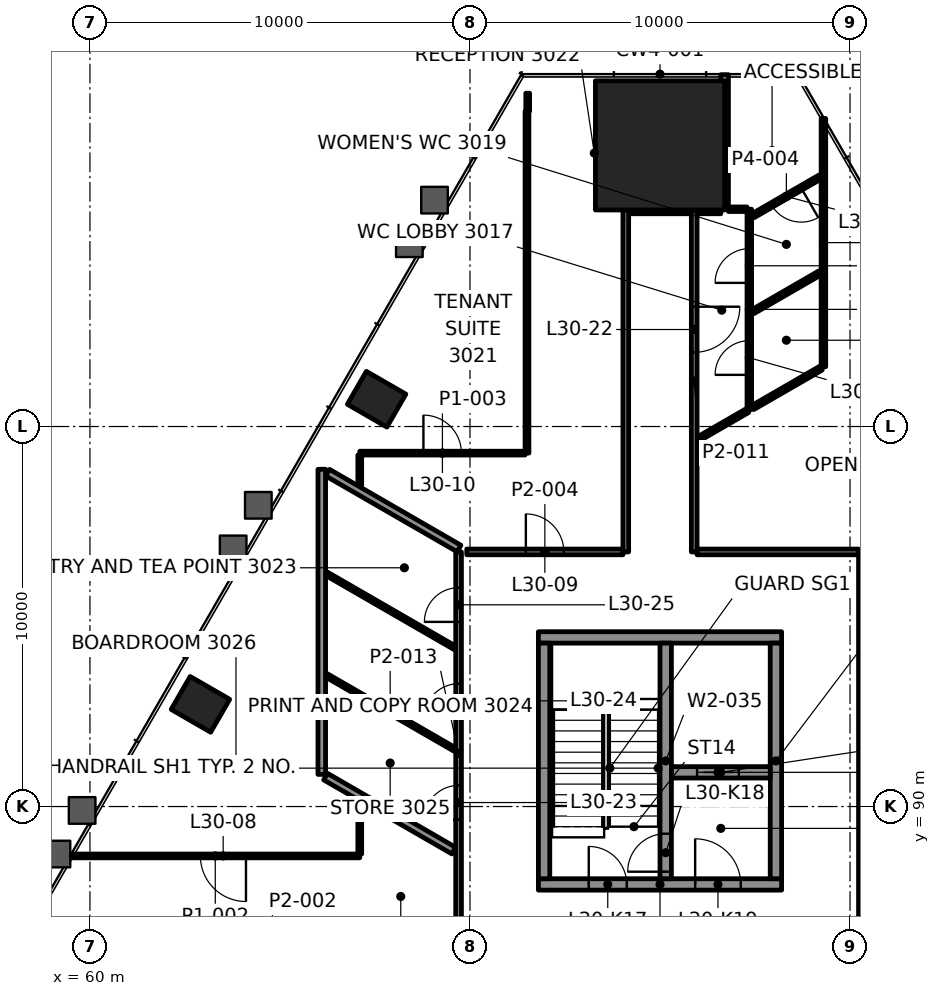
"""IFC4 building model, lengths in metres.
Left out: names, types, materials, properties, quantities, classifications, styles, units other than length and angle.
Written with IfcOpenShell. Run it as: python <this file> out.ifc"""

import sys

from ifc_helpers import new_model, si_unit, direction, frame, frame_2d, origin, origin_2d, place, context, subcontext, project, spatial, rectangle, extrude, element, fill, save


model = new_model("IFC4")
c1 = context("Model", 3, precision=1e-05, world=origin(), true_north=direction((0.0, 1.0)))
c2 = subcontext(c1, "Body", "Model", "MODEL_VIEW")
j1 = project(units=[si_unit("LENGTHUNIT", "METRE"), si_unit("PLANEANGLEUNIT", "RADIAN")], contexts=[c1])
p1 = place(None, origin())
s1 = spatial("IfcSite", under=j1, at=p1, CompositionType="ELEMENT")
p2 = place(p1, origin())
s2 = spatial("IfcBuilding", under=s1, at=p2, CompositionType="ELEMENT")
p3 = place(p2, frame((0.0, 0.0, 132.4)))
s3 = spatial("IfcBuildingStorey", under=s2, at=p3, CompositionType="ELEMENT", Elevation=132.4)
p4 = place(p3, frame((75.0, 107.399, 0.0), z_axis=(0.0, 0.0, 1.0), x_axis=(-1.0, 0.0, 0.0)))
e1 = element("IfcColumn", 1, at=p4, inside=s3, PredefinedType="COLUMN", context=c2, shape_type="SweptSolid", body=[
    extrude(rectangle(XDim=3.4, YDim=3.4, at=origin_2d()), origin(), (0.0, 0.0, 1.0), 4.2),
])
for number, where, z_axis, x_axis in (
    (2, (67.543, 100.719, -0.0), (0.0, 0.0, 1.0), (-0.5, -0.866, 0.0)),
    (3, (62.907, 92.688, -0.0), (0.0, 0.0, 1.0), (-0.5, -0.866, 0.0)),
):
    element("IfcColumn", number, at=place(p3, frame(where, z_axis=z_axis, x_axis=x_axis)), inside=s3, PredefinedType="COLUMN", context=c2, shape_type="SweptSolid", body=[
        extrude(rectangle(XDim=1.0, YDim=1.2, at=origin_2d()), origin(), (0.0, 0.0, 1.0), 4.2),
    ])
p5 = place(p3, frame((71.8, 87.95, 0.0), z_axis=(0.0, 0.0, 1.0), x_axis=(1.0, 0.0, 0.0)))
e4 = element("IfcWall", 4, at=p5, inside=s3, PredefinedType="SHEAR", context=c2, shape_type="SweptSolid", body=[
    extrude(rectangle(XDim=6.4, YDim=0.3, at=frame_2d((3.2, 0.0))), origin(), (0.0, 0.0, 1.0), 4.0),
])
p6 = place(p5, frame((1.325, 0.0, 0.0)))
e5 = element("IfcOpeningElement", 5, at=p6, cuts=e4, PredefinedType="OPENING", context=c2, shape_type="SweptSolid", body=[
    extrude(rectangle(XDim=1.0, YDim=2.1, at=frame_2d((0.5, 1.05))), frame((0.0, 0.16, 0.0), z_axis=(0.0, -1.0, 0.0), x_axis=(1.0, 0.0, 0.0)), (0.0, 0.0, 1.0), 0.32),
])
p7 = place(p5, frame((4.125, 0.0, 0.0)))
e6 = element("IfcOpeningElement", 6, at=p7, cuts=e4, PredefinedType="OPENING", context=c2, shape_type="SweptSolid", body=[
    extrude(rectangle(XDim=1.2, YDim=2.1, at=frame_2d((0.6, 1.05))), frame((0.0, 0.16, 0.0), z_axis=(0.0, -1.0, 0.0), x_axis=(1.0, 0.0, 0.0)), (0.0, 0.0, 1.0), 0.32),
])
p8 = place(p3, frame((71.8, 94.45, 0.0), z_axis=(0.0, 0.0, 1.0), x_axis=(1.0, 0.0, 0.0)))
e7 = element("IfcWall", 7, at=p8, inside=s3, PredefinedType="SHEAR", context=c2, shape_type="SweptSolid", body=[
    extrude(rectangle(XDim=6.4, YDim=0.3, at=frame_2d((3.2, 0.0))), origin(), (0.0, 0.0, 1.0), 4.0),
])
for number, where, z_axis, x_axis in (
    (8, (71.95, 88.1, 0.0), (0.0, 0.0, 1.0), (0.0, 1.0, 0.0)),
    (9, (78.05, 88.1, 0.0), (0.0, 0.0, 1.0), (0.0, 1.0, 0.0)),
):
    element("IfcWall", number, at=place(p3, frame(where, z_axis=z_axis, x_axis=x_axis)), inside=s3, PredefinedType="SHEAR", context=c2, shape_type="SweptSolid", body=[
        extrude(rectangle(XDim=6.2, YDim=0.3, at=frame_2d((3.1, 0.0))), origin(), (0.0, 0.0, 1.0), 4.0),
    ])
p9 = place(p3, frame((75.3, 90.9, 0.0), z_axis=(0.0, 0.0, 1.0), x_axis=(1.0, 0.0, 0.0)))
e10 = element("IfcWall", 10, at=p9, inside=s3, PredefinedType="SHEAR", context=c2, shape_type="SweptSolid", body=[
    extrude(rectangle(XDim=2.6, YDim=0.3, at=frame_2d((1.3, 0.0))), origin(), (0.0, 0.0, 1.0), 4.0),
])
p10 = place(p9, frame((0.675, 0.0, 0.0)))
e11 = element("IfcOpeningElement", 11, at=p10, cuts=e10, PredefinedType="OPENING", context=c2, shape_type="SweptSolid", body=[
    extrude(rectangle(XDim=1.1, YDim=2.1, at=frame_2d((0.55, 1.05))), frame((0.0, 0.16, 0.0), z_axis=(0.0, -1.0, 0.0), x_axis=(1.0, 0.0, 0.0)), (0.0, 0.0, 1.0), 0.32),
])
p11 = place(p3, frame((75.15, 88.1, 0.0), z_axis=(0.0, 0.0, 1.0), x_axis=(0.0, 1.0, 0.0)))
e12 = element("IfcWall", 12, at=p11, inside=s3, PredefinedType="SHEAR", context=c2, shape_type="SweptSolid", body=[
    extrude(rectangle(XDim=6.2, YDim=0.3, at=frame_2d((3.1, 0.0))), origin(), (0.0, 0.0, 1.0), 4.0),
])
p12 = place(p11, frame((0.185, 0.0, 0.0)))
e13 = element("IfcOpeningElement", 13, at=p12, cuts=e12, PredefinedType="OPENING", context=c2, shape_type="SweptSolid", body=[
    extrude(rectangle(XDim=1.0, YDim=2.1, at=frame_2d((0.5, 1.05))), frame((0.0, 0.16, 0.0), z_axis=(0.0, -1.0, 0.0), x_axis=(1.0, 0.0, 0.0)), (0.0, 0.0, 1.0), 0.32),
])
p13 = place(p3, frame((67.1, 88.7, 0.0), z_axis=(0.0, 0.0, 1.0), x_axis=(-1.0, 0.0, 0.0)))
e14 = element("IfcWall", 14, at=p13, inside=s3, PredefinedType="PARTITIONING", context=c2, shape_type="SweptSolid", body=[
    extrude(rectangle(XDim=7.604, YDim=0.1, at=frame_2d((3.802, 0.0))), origin(), (0.0, 0.0, 1.0), 3.165),
])
p14 = place(p13, frame((2.994, 0.0, 0.0)))
e15 = element("IfcOpeningElement", 15, at=p14, cuts=e14, PredefinedType="OPENING", context=c2, shape_type="SweptSolid", body=[
    extrude(rectangle(XDim=1.2, YDim=2.1, at=frame_2d((0.6, 1.05))), frame((0.0, 0.06, 0.0), z_axis=(0.0, -1.0, 0.0), x_axis=(1.0, 0.0, 0.0)), (0.0, 0.0, 1.0), 0.12),
])
p15 = place(p3, frame((69.915, 96.7, 0.0), z_axis=(0.0, 0.0, 1.0), x_axis=(1.0, 0.0, 0.0)))
e16 = element("IfcWall", 16, at=p15, inside=s3, PredefinedType="PARTITIONING", context=c2, shape_type="SweptSolid", body=[
    extrude(rectangle(XDim=4.11, YDim=0.15, at=frame_2d((2.055, 0.0))), origin(), (0.0, 0.0, 1.0), 3.4),
])
p16 = place(p15, frame((1.555, 0.0, 0.0)))
e17 = element("IfcOpeningElement", 17, at=p16, cuts=e16, PredefinedType="OPENING", context=c2, shape_type="SweptSolid", body=[
    extrude(rectangle(XDim=1.0, YDim=2.1, at=frame_2d((0.5, 1.05))), frame((0.0, 0.085, 0.0), z_axis=(0.0, -1.0, 0.0), x_axis=(1.0, 0.0, 0.0)), (0.0, 0.0, 1.0), 0.17),
])
p17 = place(p3, frame((75.975, 96.7, 0.0), z_axis=(0.0, 0.0, 1.0), x_axis=(1.0, 0.0, 0.0)))
e18 = element("IfcWall", 18, at=p17, inside=s3, PredefinedType="PARTITIONING", context=c2, shape_type="SweptSolid", body=[
    extrude(rectangle(XDim=4.249, YDim=0.15, at=frame_2d((2.125, 0.0))), origin(), (0.0, 0.0, 1.0), 3.4),
])
p18 = place(p3, frame((67.1, 99.3, 0.0), z_axis=(0.0, 0.0, 1.0), x_axis=(1.0, 0.0, 0.0)))
e19 = element("IfcWall", 19, at=p18, inside=s3, PredefinedType="PARTITIONING", context=c2, shape_type="SweptSolid", body=[
    extrude(rectangle(XDim=4.349, YDim=0.1, at=frame_2d((2.175, 0.0))), origin(), (0.0, 0.0, 1.0), 3.4),
])
p19 = place(p18, frame((1.675, 0.0, 0.0)))
e20 = element("IfcOpeningElement", 20, at=p19, cuts=e19, PredefinedType="OPENING", context=c2, shape_type="SweptSolid", body=[
    extrude(rectangle(XDim=1.0, YDim=2.1, at=frame_2d((0.5, 1.05))), frame((0.0, 0.06, 0.0), z_axis=(0.0, -1.0, 0.0), x_axis=(1.0, 0.0, 0.0)), (0.0, 0.0, 1.0), 0.12),
])
p20 = place(p3, frame((74.176, 105.699, 0.0), z_axis=(0.0, 0.0, 1.0), x_axis=(1.0, 0.0, 0.0)))
e21 = element("IfcWall", 21, at=p20, inside=s3, PredefinedType="PARTITIONING", context=c2, shape_type="SweptSolid", body=[
    extrude(rectangle(XDim=1.649, YDim=0.2, at=frame_2d((0.825, 0.0))), origin(), (0.0, 0.0, 1.0), 3.397),
])
p21 = place(p3, frame((76.8, 105.718, 0.0), z_axis=(0.0, 0.0, 1.0), x_axis=(1.0, 0.0, 0.0)))
e22 = element("IfcWall", 22, at=p21, inside=s3, PredefinedType="PARTITIONING", context=c2, shape_type="SweptSolid", body=[
    extrude(rectangle(XDim=0.49, YDim=0.12, at=frame_2d((0.245, 0.0))), origin(), (0.0, 0.0, 1.0), 3.4),
])
p22 = place(p3, frame((76.01, 99.673, 0.0), z_axis=(0.0, 0.0, 1.0), x_axis=(0.865943626461, 0.500141615736, 0.0)))
e23 = element("IfcWall", 23, at=p22, inside=s3, PredefinedType="PARTITIONING", context=c2, shape_type="SweptSolid", body=[
    extrude(rectangle(XDim=1.496, YDim=0.12, at=frame_2d((0.748, 0.0))), origin(), (0.0, 0.0, 1.0), 3.4),
])
p23 = place(p3, frame((77.445, 103.024, 0.0), z_axis=(0.0, 0.0, 1.0), x_axis=(0.866039589866, 0.499975428181, 0.0)))
e24 = element("IfcWall", 24, at=p23, inside=s3, PredefinedType="PARTITIONING", context=c2, shape_type="SweptSolid", body=[
    extrude(rectangle(XDim=2.033, YDim=0.12, at=frame_2d((1.016, 0.0))), origin(), (0.0, 0.0, 1.0), 3.4),
])
p24 = place(p3, frame((79.205, 106.562, 0.0), z_axis=(0.0, 0.0, 1.0), x_axis=(-0.866017611601, -0.500013496215, 0.0)))
e25 = element("IfcWall", 25, at=p24, inside=s3, PredefinedType="PARTITIONING", context=c2, shape_type="SweptSolid", body=[
    extrude(rectangle(XDim=2.033, YDim=0.12, at=frame_2d((1.017, 0.0))), origin(), (0.0, 0.0, 1.0), 3.4),
])
p25 = place(p24, frame((0.567, 0.0, 0.0)))
e26 = element("IfcOpeningElement", 26, at=p25, cuts=e25, PredefinedType="OPENING", context=c2, shape_type="SweptSolid", body=[
    extrude(rectangle(XDim=0.9, YDim=2.1, at=frame_2d((0.45, 1.05))), frame((0.0, 0.07, 0.0), z_axis=(0.0, -1.0, 0.0), x_axis=(1.0, 0.0, 0.0)), (0.0, 0.0, 1.0), 0.14),
])
p26 = place(p3, frame((80.3, 86.1, 0.0), z_axis=(0.0, 0.0, 1.0), x_axis=(0.0, 1.0, 0.0)))
e27 = element("IfcWall", 27, at=p26, inside=s3, PredefinedType="PARTITIONING", context=c2, shape_type="SweptSolid", body=[
    extrude(rectangle(XDim=10.599, YDim=0.15, at=frame_2d((5.3, 0.0))), origin(), (0.0, 0.0, 1.0), 3.322),
])
p27 = place(p3, frame((79.3, 101.573, 0.0), z_axis=(0.0, 0.0, 1.0), x_axis=(0.0, 1.0, 0.0)))
e28 = element("IfcWall", 28, at=p27, inside=s3, PredefinedType="PARTITIONING", context=c2, shape_type="SweptSolid", body=[
    extrude(rectangle(XDim=6.533, YDim=0.12, at=frame_2d((3.267, 0.0))), origin(), (0.0, 0.0, 1.0), 3.4),
])
p28 = place(p3, frame((77.35, 100.447, 0.0), z_axis=(0.0, 0.0, 1.0), x_axis=(0.0, 1.0, 0.0)))
e29 = element("IfcWall", 29, at=p28, inside=s3, PredefinedType="PARTITIONING", context=c2, shape_type="SweptSolid", body=[
    extrude(rectangle(XDim=5.271, YDim=0.12, at=frame_2d((2.635, 0.0))), origin(), (0.0, 0.0, 1.0), 3.4),
])
p29 = place(p28, frame((0.913, 0.0, 0.0)))
e30 = element("IfcOpeningElement", 30, at=p29, cuts=e29, PredefinedType="OPENING", context=c2, shape_type="SweptSolid", body=[
    extrude(rectangle(XDim=0.9, YDim=2.1, at=frame_2d((0.45, 1.05))), frame((0.0, 0.07, 0.0), z_axis=(0.0, -1.0, 0.0), x_axis=(1.0, 0.0, 0.0)), (0.0, 0.0, 1.0), 0.14),
])
p30 = place(p28, frame((3.333, 0.0, 0.0)))
e31 = element("IfcOpeningElement", 31, at=p30, cuts=e29, PredefinedType="OPENING", context=c2, shape_type="SweptSolid", body=[
    extrude(rectangle(XDim=0.9, YDim=2.1, at=frame_2d((0.45, 1.05))), frame((0.0, 0.07, 0.0), z_axis=(0.0, -1.0, 0.0), x_axis=(1.0, 0.0, 0.0)), (0.0, 0.0, 1.0), 0.14),
])
p31 = place(p3, frame((76.7, 105.715, 0.0), z_axis=(0.0, 0.0, 1.0), x_axis=(0.0, 1.0, 0.0)))
e32 = element("IfcWall", 32, at=p31, inside=s3, PredefinedType="PARTITIONING", context=c2, shape_type="SweptSolid", body=[
    extrude(rectangle(XDim=3.543, YDim=0.2, at=frame_2d((1.772, 0.0))), origin(), (0.0, 0.0, 1.0), 3.4),
])
p32 = place(p3, frame((75.9, 105.698, 0.0), z_axis=(0.0, 0.0, 1.0), x_axis=(0.0, -1.0, 0.0)))
e33 = element("IfcWall", 33, at=p32, inside=s3, PredefinedType="PARTITIONING", context=c2, shape_type="SweptSolid", body=[
    extrude(rectangle(XDim=8.999, YDim=0.15, at=frame_2d((4.499, 0.0))), origin(), (0.0, 0.0, 1.0), 3.4),
])
p33 = place(p32, frame((2.546, 0.0, 0.0)))
e34 = element("IfcOpeningElement", 34, at=p33, cuts=e33, PredefinedType="OPENING", context=c2, shape_type="SweptSolid", body=[
    extrude(rectangle(XDim=1.2, YDim=2.1, at=frame_2d((0.6, 1.05))), frame((0.0, 0.085, 0.0), z_axis=(0.0, -1.0, 0.0), x_axis=(1.0, 0.0, 0.0)), (0.0, 0.0, 1.0), 0.17),
])
p34 = place(p3, frame((74.1, 96.7, 0.0), z_axis=(0.0, 0.0, 1.0), x_axis=(0.0, 1.0, 0.0)))
e35 = element("IfcWall", 35, at=p34, inside=s3, PredefinedType="PARTITIONING", context=c2, shape_type="SweptSolid", body=[
    extrude(rectangle(XDim=8.998, YDim=0.15, at=frame_2d((4.499, 0.0))), origin(), (0.0, 0.0, 1.0), 3.4),
])
p35 = place(p3, frame((71.519, 108.299, 0.0), z_axis=(0.0, 0.0, 1.0), x_axis=(0.0, 1.0, 0.0)))
e36 = element("IfcWall", 36, at=p35, inside=s3, PredefinedType="PARTITIONING", context=c2, shape_type="SweptSolid", body=[
    extrude(rectangle(XDim=0.473, YDim=0.1, at=frame_2d((0.236, 0.0))), origin(), (0.0, 0.0, 1.0), 3.4),
])
p36 = place(p3, frame((71.5, 99.301, 0.0), z_axis=(0.0, 0.0, 1.0), x_axis=(0.0, 1.0, 0.0)))
e37 = element("IfcWall", 37, at=p36, inside=s3, PredefinedType="PARTITIONING", context=c2, shape_type="SweptSolid", body=[
    extrude(rectangle(XDim=8.998, YDim=0.1, at=frame_2d((4.499, 0.0))), origin(), (0.0, 0.0, 1.0), 3.4),
])
p37 = place(p3, frame((69.7, 86.1, 0.0), z_axis=(0.0, 0.0, 1.0), x_axis=(0.0, 1.0, 0.0)))
e38 = element("IfcWall", 38, at=p37, inside=s3, PredefinedType="PARTITIONING", context=c2, shape_type="SweptSolid", body=[
    extrude(rectangle(XDim=10.6, YDim=0.15, at=frame_2d((5.3, 0.0))), origin(), (0.0, 0.0, 1.0), 3.322),
])
p38 = place(p37, frame((3.555, 0.0, 0.0)))
e39 = element("IfcOpeningElement", 39, at=p38, cuts=e38, PredefinedType="OPENING", context=c2, shape_type="SweptSolid", body=[
    extrude(rectangle(XDim=0.9, YDim=2.1, at=frame_2d((0.45, 1.05))), frame((0.0, 0.085, 0.0), z_axis=(0.0, -1.0, 0.0), x_axis=(1.0, 0.0, 0.0)), (0.0, 0.0, 1.0), 0.17),
])
p39 = place(p37, frame((6.232, 0.0, 0.0)))
e40 = element("IfcOpeningElement", 40, at=p39, cuts=e38, PredefinedType="OPENING", context=c2, shape_type="SweptSolid", body=[
    extrude(rectangle(XDim=0.9, YDim=2.1, at=frame_2d((0.45, 1.05))), frame((0.0, 0.085, 0.0), z_axis=(0.0, -1.0, 0.0), x_axis=(1.0, 0.0, 0.0)), (0.0, 0.0, 1.0), 0.17),
])
p40 = place(p37, frame((8.759, 0.0, 0.0)))
e41 = element("IfcOpeningElement", 41, at=p40, cuts=e38, PredefinedType="OPENING", context=c2, shape_type="SweptSolid", body=[
    extrude(rectangle(XDim=0.9, YDim=2.1, at=frame_2d((0.45, 1.05))), frame((0.0, 0.085, 0.0), z_axis=(0.0, -1.0, 0.0), x_axis=(1.0, 0.0, 0.0)), (0.0, 0.0, 1.0), 0.17),
])
p41 = place(p3, frame((67.1, 88.75, 0.0), z_axis=(0.0, 0.0, 1.0), x_axis=(0.0, 1.0, 0.0)))
e42 = element("IfcWall", 42, at=p41, inside=s3, PredefinedType="PARTITIONING", context=c2, shape_type="SweptSolid", body=[
    extrude(rectangle(XDim=1.372, YDim=0.1, at=frame_2d((0.686, 0.0))), origin(), (0.0, 0.0, 1.0), 3.322),
])
p42 = place(p3, frame((67.1, 98.443, 0.0), z_axis=(0.0, 0.0, 1.0), x_axis=(0.0, 1.0, 0.0)))
e43 = element("IfcWall", 43, at=p42, inside=s3, PredefinedType="PARTITIONING", context=c2, shape_type="SweptSolid", body=[
    extrude(rectangle(XDim=0.807, YDim=0.1, at=frame_2d((0.403, 0.0))), origin(), (0.0, 0.0, 1.0), 3.4),
])
p43 = place(p3, frame((66.1, 90.846, 0.0), z_axis=(0.0, 0.0, 1.0), x_axis=(0.0, 1.0, 0.0)))
e44 = element("IfcWall", 44, at=p43, inside=s3, PredefinedType="PARTITIONING", context=c2, shape_type="SweptSolid", body=[
    extrude(rectangle(XDim=8.029, YDim=0.2, at=frame_2d((4.014, 0.0))), origin(), (0.0, 0.0, 1.0), 3.165),
])
p44 = place(p3, frame((69.711, 96.79, 0.0), z_axis=(0.0, 0.0, 1.0), x_axis=(-0.866021621257, 0.500006551472, 0.0)))
e45 = element("IfcWall", 45, at=p44, inside=s3, PredefinedType="PARTITIONING", context=c2, shape_type="SweptSolid", body=[
    extrude(rectangle(XDim=3.992, YDim=0.2, at=frame_2d((1.996, 0.0))), origin(), (0.0, 0.0, 1.0), 3.165),
])
p45 = place(p3, frame((69.599, 94.178, 0.0), z_axis=(0.0, 0.0, 1.0), x_axis=(-0.866016482536, 0.500015451737, 0.0)))
e46 = element("IfcWall", 46, at=p45, inside=s3, PredefinedType="PARTITIONING", context=c2, shape_type="SweptSolid", body=[
    extrude(rectangle(XDim=3.895, YDim=0.1, at=frame_2d((1.948, 0.0))), origin(), (0.0, 0.0, 1.0), 3.4),
])
p46 = place(p3, frame((69.599, 91.501, 0.0), z_axis=(0.0, 0.0, 1.0), x_axis=(-0.866043624834, 0.499968438888, 0.0)))
e47 = element("IfcWall", 47, at=p46, inside=s3, PredefinedType="PARTITIONING", context=c2, shape_type="SweptSolid", body=[
    extrude(rectangle(XDim=3.895, YDim=0.1, at=frame_2d((1.947, 0.0))), origin(), (0.0, 0.0, 1.0), 3.4),
])
p47 = place(p3, frame((69.573, 88.84, 0.0), z_axis=(0.0, 0.0, 1.0), x_axis=(-0.866043624834, 0.499968438888, 0.0)))
e48 = element("IfcWall", 48, at=p47, inside=s3, PredefinedType="PARTITIONING", context=c2, shape_type="SweptSolid", body=[
    extrude(rectangle(XDim=3.895, YDim=0.2, at=frame_2d((1.947, 0.0))), origin(), (0.0, 0.0, 1.0), 3.322),
])
p48 = place(p3, frame((75.975, 105.699, 0.0), z_axis=(0.0, 0.0, 1.0), x_axis=(1.0, 0.0, 0.0)))
e49 = element("IfcWall", 49, at=p48, inside=s3, PredefinedType="PARTITIONING", context=c2, shape_type="SweptSolid", body=[
    extrude(rectangle(XDim=0.625, YDim=0.2, at=frame_2d((0.312, 0.0))), origin(), (0.0, 0.0, 1.0), 3.4),
])
p49 = place(p3, frame((77.44, 100.499, 0.0), z_axis=(0.0, 0.0, 1.0), x_axis=(0.865986040326, 0.500068173313, 0.0)))
e50 = element("IfcWall", 50, at=p49, inside=s3, PredefinedType="PARTITIONING", context=c2, shape_type="SweptSolid", body=[
    extrude(rectangle(XDim=2.078, YDim=0.12, at=frame_2d((1.039, 0.0))), origin(), (0.0, 0.0, 1.0), 3.4),
])
p50 = place(p14, origin())
e51 = element("IfcDoor", 51, at=p50, inside=s3, OperationType="DOUBLE_DOOR_SINGLE_SWING", PredefinedType="DOOR", context=c2, shape_type="SweptSolid", body=[
    extrude(rectangle(XDim=1.2, YDim=2.1, at=frame_2d((0.6, 1.05))), frame((0.0, 0.025, 0.0), z_axis=(0.0, -1.0, 0.0), x_axis=(1.0, 0.0, 0.0)), (0.0, 0.0, 1.0), 0.05),
])
fill(e15, e51)
p51 = place(p16, origin())
e52 = element("IfcDoor", 52, at=p51, inside=s3, OperationType="SINGLE_SWING_LEFT", PredefinedType="DOOR", context=c2, shape_type="SweptSolid", body=[
    extrude(rectangle(XDim=1.0, YDim=2.1, at=frame_2d((0.5, 1.05))), frame((0.0, 0.025, 0.0), z_axis=(0.0, -1.0, 0.0), x_axis=(1.0, 0.0, 0.0)), (0.0, 0.0, 1.0), 0.05),
])
fill(e17, e52)
p52 = place(p19, origin())
e53 = element("IfcDoor", 53, at=p52, inside=s3, OperationType="SINGLE_SWING_RIGHT", PredefinedType="DOOR", context=c2, shape_type="SweptSolid", body=[
    extrude(rectangle(XDim=1.0, YDim=2.1, at=frame_2d((0.5, 1.05))), frame((0.0, 0.025, 0.0), z_axis=(0.0, -1.0, 0.0), x_axis=(1.0, 0.0, 0.0)), (0.0, 0.0, 1.0), 0.05),
])
fill(e20, e53)
p53 = place(p25, origin())
e54 = element("IfcDoor", 54, at=p53, inside=s3, OperationType="SINGLE_SWING_RIGHT", PredefinedType="DOOR", context=c2, shape_type="SweptSolid", body=[
    extrude(rectangle(XDim=0.9, YDim=2.1, at=frame_2d((0.45, 1.05))), frame((0.0, 0.025, 0.0), z_axis=(0.0, -1.0, 0.0), x_axis=(1.0, 0.0, 0.0)), (0.0, 0.0, 1.0), 0.05),
])
fill(e26, e54)
p54 = place(p29, origin())
e55 = element("IfcDoor", 55, at=p54, inside=s3, OperationType="SINGLE_SWING_LEFT", PredefinedType="DOOR", context=c2, shape_type="SweptSolid", body=[
    extrude(rectangle(XDim=0.9, YDim=2.1, at=frame_2d((0.45, 1.05))), frame((0.0, 0.025, 0.0), z_axis=(0.0, -1.0, 0.0), x_axis=(1.0, 0.0, 0.0)), (0.0, 0.0, 1.0), 0.05),
])
fill(e30, e55)
p55 = place(p30, origin())
e56 = element("IfcDoor", 56, at=p55, inside=s3, OperationType="SINGLE_SWING_RIGHT", PredefinedType="DOOR", context=c2, shape_type="SweptSolid", body=[
    extrude(rectangle(XDim=0.9, YDim=2.1, at=frame_2d((0.45, 1.05))), frame((0.0, 0.025, 0.0), z_axis=(0.0, -1.0, 0.0), x_axis=(1.0, 0.0, 0.0)), (0.0, 0.0, 1.0), 0.05),
])
fill(e31, e56)
p56 = place(p33, origin())
e57 = element("IfcDoor", 57, at=p56, inside=s3, OperationType="DOUBLE_DOOR_SINGLE_SWING", PredefinedType="DOOR", context=c2, shape_type="SweptSolid", body=[
    extrude(rectangle(XDim=1.2, YDim=2.1, at=frame_2d((0.6, 1.05))), frame((0.0, 0.025, 0.0), z_axis=(0.0, -1.0, 0.0), x_axis=(1.0, 0.0, 0.0)), (0.0, 0.0, 1.0), 0.05),
])
fill(e34, e57)
p57 = place(p38, origin())
e58 = element("IfcDoor", 58, at=p57, inside=s3, OperationType="SINGLE_SWING_RIGHT", PredefinedType="DOOR", context=c2, shape_type="SweptSolid", body=[
    extrude(rectangle(XDim=0.9, YDim=2.1, at=frame_2d((0.45, 1.05))), frame((0.0, 0.025, 0.0), z_axis=(0.0, -1.0, 0.0), x_axis=(1.0, 0.0, 0.0)), (0.0, 0.0, 1.0), 0.05),
])
fill(e39, e58)
p58 = place(p39, origin())
e59 = element("IfcDoor", 59, at=p58, inside=s3, OperationType="SINGLE_SWING_LEFT", PredefinedType="DOOR", context=c2, shape_type="SweptSolid", body=[
    extrude(rectangle(XDim=0.9, YDim=2.1, at=frame_2d((0.45, 1.05))), frame((0.0, 0.025, 0.0), z_axis=(0.0, -1.0, 0.0), x_axis=(1.0, 0.0, 0.0)), (0.0, 0.0, 1.0), 0.05),
])
fill(e40, e59)
p59 = place(p40, origin())
e60 = element("IfcDoor", 60, at=p59, inside=s3, OperationType="SINGLE_SWING_RIGHT", PredefinedType="DOOR", context=c2, shape_type="SweptSolid", body=[
    extrude(rectangle(XDim=0.9, YDim=2.1, at=frame_2d((0.45, 1.05))), frame((0.0, 0.025, 0.0), z_axis=(0.0, -1.0, 0.0), x_axis=(1.0, 0.0, 0.0)), (0.0, 0.0, 1.0), 0.05),
])
fill(e41, e60)
p60 = place(p10, origin())
e61 = element("IfcDoor", 61, at=p60, inside=s3, OperationType="DOUBLE_DOOR_SLIDING", PredefinedType="DOOR", context=c2, shape_type="SweptSolid", body=[
    extrude(rectangle(XDim=1.1, YDim=2.1, at=frame_2d((0.55, 1.05))), frame((0.0, 0.025, 0.0), z_axis=(0.0, -1.0, 0.0), x_axis=(1.0, 0.0, 0.0)), (0.0, 0.0, 1.0), 0.05),
])
fill(e11, e61)
p61 = place(p6, origin())
e62 = element("IfcDoor", 62, at=p61, inside=s3, OperationType="SINGLE_SWING_RIGHT", PredefinedType="DOOR", context=c2, shape_type="SweptSolid", body=[
    extrude(rectangle(XDim=1.0, YDim=2.1, at=frame_2d((0.5, 1.05))), frame((0.0, 0.025, 0.0), z_axis=(0.0, -1.0, 0.0), x_axis=(1.0, 0.0, 0.0)), (0.0, 0.0, 1.0), 0.05),
])
fill(e5, e62)
p62 = place(p12, origin())
e63 = element("IfcDoor", 63, at=p62, inside=s3, OperationType="SINGLE_SWING_LEFT", PredefinedType="DOOR", context=c2, shape_type="SweptSolid", body=[
    extrude(rectangle(XDim=1.0, YDim=2.1, at=frame_2d((0.5, 1.05))), frame((0.0, 0.025, 0.0), z_axis=(0.0, -1.0, 0.0), x_axis=(1.0, 0.0, 0.0)), (0.0, 0.0, 1.0), 0.05),
])
fill(e13, e63)
p63 = place(p7, origin())
e64 = element("IfcDoor", 64, at=p63, inside=s3, OperationType="SINGLE_SWING_RIGHT", PredefinedType="DOOR", context=c2, shape_type="SweptSolid", body=[
    extrude(rectangle(XDim=1.2, YDim=2.1, at=frame_2d((0.6, 1.05))), frame((0.0, 0.025, 0.0), z_axis=(0.0, -1.0, 0.0), x_axis=(1.0, 0.0, 0.0)), (0.0, 0.0, 1.0), 0.05),
])
fill(e6, e64)
save(model, sys.argv[1])
